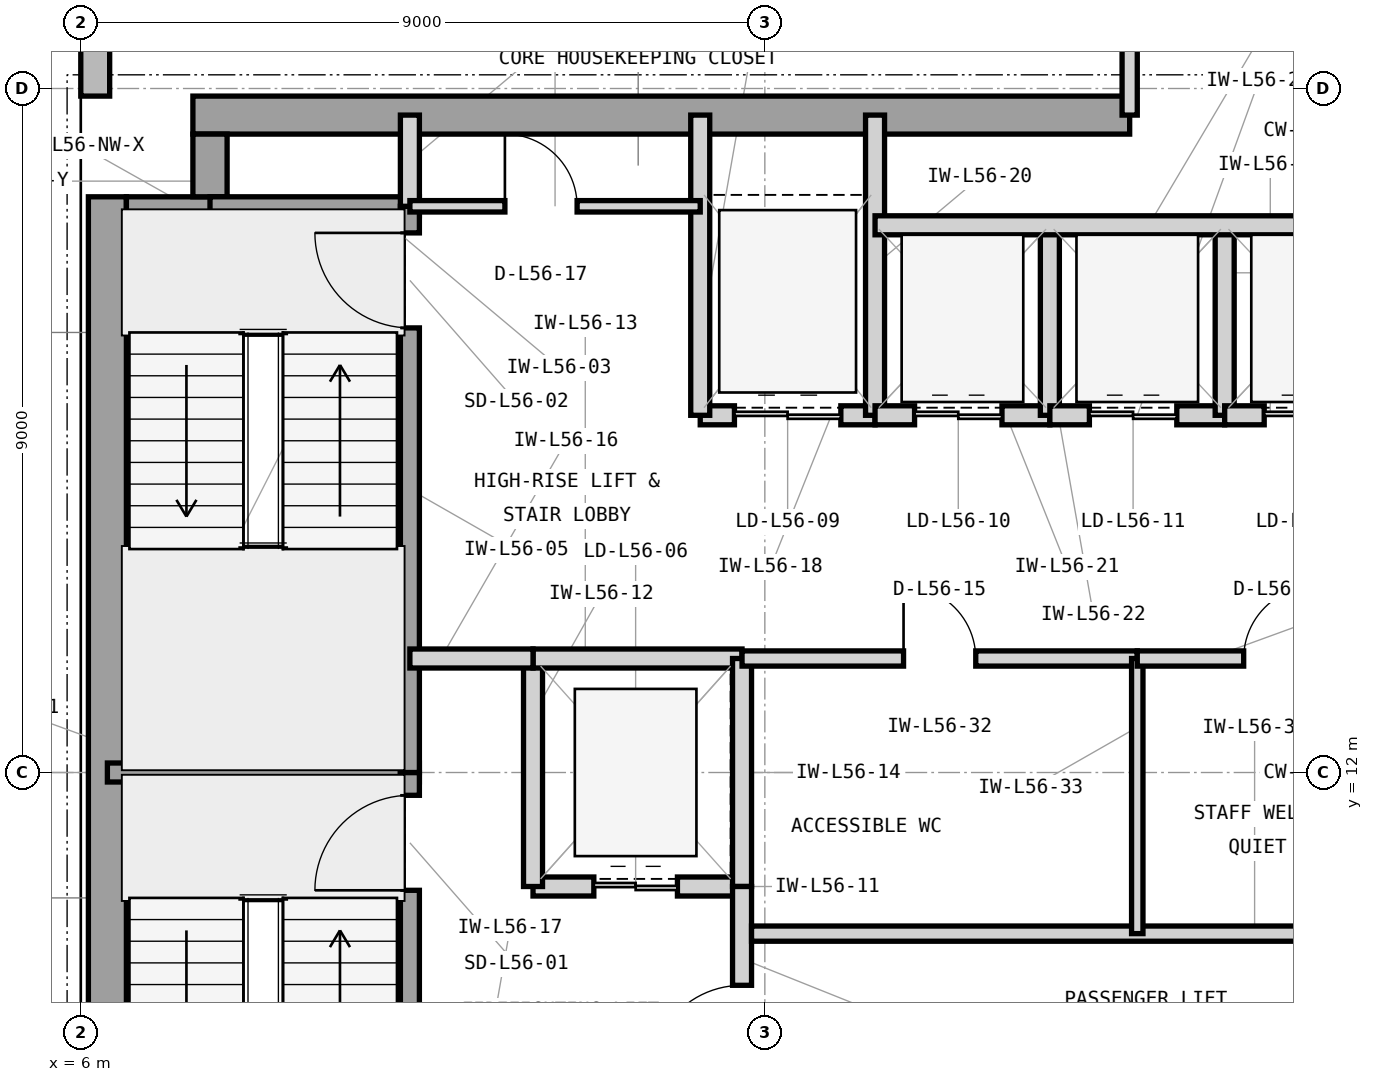
"""IFC4 building model, lengths in metres.
Left out: names, types, materials, properties, quantities, classifications, styles, units other than length and angle.
Written with IfcOpenShell. Run it as: python <this file> out.ifc"""

import sys

from ifc_helpers import new_model, si_unit, direction, frame, frame_2d, origin, place, context, subcontext, project, spatial, rectangle, extrude, element, fill, save


model = new_model("IFC4")
c1 = context("Model", 3, precision=1e-05, world=origin(), true_north=direction((0.0, 1.0)))
c2 = subcontext(c1, "Body", "Model", "MODEL_VIEW")
j1 = project(units=[si_unit("LENGTHUNIT", "METRE"), si_unit("PLANEANGLEUNIT", "RADIAN")], contexts=[c1])
p1 = place(None, origin())
s1 = spatial("IfcSite", under=j1, at=p1, CompositionType="ELEMENT")
p2 = place(p1, origin())
s2 = spatial("IfcBuilding", under=s1, at=p2, CompositionType="ELEMENT")
p3 = place(p2, frame((0.0, 0.0, 231.3)))
s3 = spatial("IfcBuildingStorey", under=s2, at=p3, CompositionType="ELEMENT", Elevation=231.3)
p4 = place(p3, frame((6.35, 4.425, 0.0), z_axis=(0.0, 0.0, 1.0), x_axis=(0.0, 1.0, 0.0)))
e1 = element("IfcWall", 1, at=p4, inside=s3, PredefinedType="SHEAR", context=c2, shape_type="SweptSolid", body=[
    extrude(rectangle(XDim=15.15, YDim=0.5, at=frame_2d((7.575, 0.0))), origin(), (0.0, 0.0, 1.0), 3.9),
])
p5 = place(p3, frame((7.475, 20.65, 0.0), z_axis=(0.0, 0.0, 1.0), x_axis=(1.0, 0.0, 0.0)))
e2 = element("IfcWall", 2, at=p5, inside=s3, PredefinedType="SHEAR", context=c2, shape_type="SweptSolid", body=[
    extrude(rectangle(XDim=12.325, YDim=0.5, at=frame_2d((6.163, 0.0))), origin(), (0.0, 0.0, 1.0), 3.9),
])
p6 = place(p3, frame((6.6, 19.35, 0.0), z_axis=(0.0, 0.0, 1.0), x_axis=(1.0, 0.0, 0.0)))
e3 = element("IfcWall", 3, at=p6, inside=s3, PredefinedType="SHEAR", context=c2, shape_type="SweptSolid", body=[
    extrude(rectangle(XDim=1.325, YDim=0.45, at=frame_2d((0.663, 0.0))), origin(), (0.0, 0.0, 1.0), 3.9),
])
p7 = place(p3, frame((7.7, 19.575, 0.0), z_axis=(0.0, 0.0, 1.0), x_axis=(0.0, 1.0, 0.0)))
e4 = element("IfcWall", 4, at=p7, inside=s3, PredefinedType="SHEAR", context=c2, shape_type="SweptSolid", body=[
    extrude(rectangle(XDim=0.825, YDim=0.45, at=frame_2d((0.413, 0.0))), origin(), (0.0, 0.0, 1.0), 3.9),
])
p8 = place(p3, frame((6.19, 40.4, 0.0), z_axis=(0.0, 0.0, 1.0), x_axis=(0.0, -1.0, 0.0)))
e5 = element("IfcWall", 5, at=p8, inside=s3, PredefinedType="STANDARD", context=c2, shape_type="SweptSolid", body=[
    extrude(rectangle(XDim=19.5, YDim=0.38, at=frame_2d((9.75, 0.0))), origin(), (0.0, 0.0, 1.0), 3.7),
])
p9 = place(p8, frame((6.163, 0.0, 0.9)))
e6 = element("IfcOpeningElement", 6, at=p9, cuts=e5, PredefinedType="OPENING", context=c2, shape_type="SweptSolid", body=[
    extrude(rectangle(XDim=2.3, YDim=2.2, at=frame_2d((1.15, 1.1))), frame((0.0, 0.2, 0.0), z_axis=(0.0, -1.0, 0.0), x_axis=(1.0, 0.0, 0.0)), (0.0, 0.0, 1.0), 0.4),
])
p10 = place(p3, frame((6.35, 12.0, 0.0), z_axis=(0.0, 0.0, 1.0), x_axis=(1.0, 0.0, 0.0)))
e7 = element("IfcWall", 7, at=p10, inside=s3, PredefinedType="SHEAR", context=c2, shape_type="SweptSolid", body=[
    extrude(rectangle(XDim=4.105, YDim=0.25, at=frame_2d((2.052, 0.0))), origin(), (0.0, 0.0, 1.0), 3.9),
])
p11 = place(p3, frame((7.7, 19.45, 0.0), z_axis=(0.0, 0.0, 1.0), x_axis=(1.0, 0.0, 0.0)))
e8 = element("IfcWall", 8, at=p11, inside=s3, PredefinedType="SHEAR", context=c2, shape_type="SweptSolid", body=[
    extrude(rectangle(XDim=2.755, YDim=0.25, at=frame_2d((1.377, 0.0))), origin(), (0.0, 0.0, 1.0), 3.9),
])
p12 = place(p3, frame((10.33, 4.55, 0.0), z_axis=(0.0, 0.0, 1.0), x_axis=(0.0, 1.0, 0.0)))
e9 = element("IfcWall", 9, at=p12, inside=s3, PredefinedType="SHEAR", context=c2, shape_type="SweptSolid", body=[
    extrude(rectangle(XDim=7.45, YDim=0.25, at=frame_2d((3.725, 0.0))), origin(), (0.0, 0.0, 1.0), 3.9),
])
p13 = place(p12, frame((5.9, 0.0, 0.0)))
e10 = element("IfcOpeningElement", 10, at=p13, cuts=e9, PredefinedType="OPENING", context=c2, shape_type="SweptSolid", body=[
    extrude(rectangle(XDim=1.25, YDim=2.2, at=frame_2d((0.625, 1.1))), frame((0.0, 0.135, 0.0), z_axis=(0.0, -1.0, 0.0), x_axis=(1.0, 0.0, 0.0)), (0.0, 0.0, 1.0), 0.27),
])
p14 = place(p3, frame((10.33, 12.0, 0.0), z_axis=(0.0, 0.0, 1.0), x_axis=(0.0, 1.0, 0.0)))
e11 = element("IfcWall", 11, at=p14, inside=s3, PredefinedType="SHEAR", context=c2, shape_type="SweptSolid", body=[
    extrude(rectangle(XDim=7.45, YDim=0.25, at=frame_2d((3.725, 0.0))), origin(), (0.0, 0.0, 1.0), 3.9),
])
p15 = place(p14, frame((5.85, 0.0, 0.0)))
e12 = element("IfcOpeningElement", 12, at=p15, cuts=e11, PredefinedType="OPENING", context=c2, shape_type="SweptSolid", body=[
    extrude(rectangle(XDim=1.25, YDim=2.2, at=frame_2d((0.625, 1.1))), frame((0.0, 0.135, 0.0), z_axis=(0.0, -1.0, 0.0), x_axis=(1.0, 0.0, 0.0)), (0.0, 0.0, 1.0), 0.27),
])
p16 = place(p3, frame((10.33, 19.45, 0.0), z_axis=(0.0, 0.0, 1.0), x_axis=(0.0, 1.0, 0.0)))
e13 = element("IfcWall", 13, at=p16, inside=s3, PredefinedType="PARTITIONING", context=c2, shape_type="SweptSolid", body=[
    extrude(rectangle(XDim=1.2, YDim=0.25, at=frame_2d((0.6, 0.0))), origin(), (0.0, 0.0, 1.0), 3.69),
])
p17 = place(p3, frame((11.95, 10.5, 0.0), z_axis=(0.0, 0.0, 1.0), x_axis=(1.0, 0.0, 0.0)))
e14 = element("IfcWall", 14, at=p17, inside=s3, PredefinedType="PARTITIONING", context=c2, shape_type="SweptSolid", body=[
    extrude(rectangle(XDim=2.75, YDim=0.25, at=frame_2d((1.375, 0.0))), origin(), (0.0, 0.0, 1.0), 3.073),
])
p18 = place(p17, frame((0.8, 0.0, 0.0)))
e15 = element("IfcOpeningElement", 15, at=p18, cuts=e14, PredefinedType="OPENING", context=c2, shape_type="SweptSolid", body=[
    extrude(rectangle(XDim=1.1, YDim=2.25, at=frame_2d((0.55, 1.125))), frame((0.0, 0.135, 0.0), z_axis=(0.0, -1.0, 0.0), x_axis=(1.0, 0.0, 0.0)), (0.0, 0.0, 1.0), 0.27),
])
p19 = place(p3, frame((11.95, 10.5, 0.0), z_axis=(0.0, 0.0, 1.0), x_axis=(0.0, 1.0, 0.0)))
e16 = element("IfcWall", 16, at=p19, inside=s3, PredefinedType="PARTITIONING", context=c2, shape_type="SweptSolid", body=[
    extrude(rectangle(XDim=3.0, YDim=0.25, at=frame_2d((1.5, 0.0))), origin(), (0.0, 0.0, 1.0), 3.69),
])
p20 = place(p3, frame((11.95, 13.5, 0.0), z_axis=(0.0, 0.0, 1.0), x_axis=(1.0, 0.0, 0.0)))
e17 = element("IfcWall", 17, at=p20, inside=s3, PredefinedType="PARTITIONING", context=c2, shape_type="SweptSolid", body=[
    extrude(rectangle(XDim=2.75, YDim=0.25, at=frame_2d((1.375, 0.0))), origin(), (0.0, 0.0, 1.0), 3.073),
])
p21 = place(p3, frame((14.7, 10.5, 0.0), z_axis=(0.0, 0.0, 1.0), x_axis=(0.0, 1.0, 0.0)))
e18 = element("IfcWall", 18, at=p21, inside=s3, PredefinedType="PARTITIONING", context=c2, shape_type="SweptSolid", body=[
    extrude(rectangle(XDim=3.0, YDim=0.25, at=frame_2d((1.5, 0.0))), origin(), (0.0, 0.0, 1.0), 3.69),
])
p22 = place(p3, frame((14.7, 6.7, 0.0), z_axis=(0.0, 0.0, 1.0), x_axis=(0.0, 1.0, 0.0)))
e19 = element("IfcWall", 19, at=p22, inside=s3, PredefinedType="PARTITIONING", context=c2, shape_type="SweptSolid", body=[
    extrude(rectangle(XDim=3.8, YDim=0.25, at=frame_2d((1.9, 0.0))), origin(), (0.0, 0.0, 1.0), 3.69),
])
p23 = place(p22, frame((1.3, 0.0, 0.0)))
e20 = element("IfcOpeningElement", 20, at=p23, cuts=e19, PredefinedType="OPENING", context=c2, shape_type="SweptSolid", body=[
    extrude(rectangle(XDim=1.2, YDim=2.2, at=frame_2d((0.6, 1.1))), frame((0.0, 0.135, 0.0), z_axis=(0.0, -1.0, 0.0), x_axis=(1.0, 0.0, 0.0)), (0.0, 0.0, 1.0), 0.27),
])
p24 = place(p3, frame((10.33, 13.5, 0.0), z_axis=(0.0, 0.0, 1.0), x_axis=(1.0, 0.0, 0.0)))
e21 = element("IfcWall", 21, at=p24, inside=s3, PredefinedType="PARTITIONING", context=c2, shape_type="SweptSolid", body=[
    extrude(rectangle(XDim=1.62, YDim=0.25, at=frame_2d((0.81, 0.0))), origin(), (0.0, 0.0, 1.0), 3.073),
])
p25 = place(p3, frame((14.15, 16.7, 0.0), z_axis=(0.0, 0.0, 1.0), x_axis=(1.0, 0.0, 0.0)))
e22 = element("IfcWall", 22, at=p25, inside=s3, PredefinedType="PARTITIONING", context=c2, shape_type="SweptSolid", body=[
    extrude(rectangle(XDim=2.3, YDim=0.25, at=frame_2d((1.15, 0.0))), origin(), (0.0, 0.0, 1.0), 3.073),
])
p26 = place(p25, frame((0.45, 0.0, 0.0)))
e23 = element("IfcOpeningElement", 23, at=p26, cuts=e22, PredefinedType="OPENING", context=c2, shape_type="SweptSolid", body=[
    extrude(rectangle(XDim=1.4, YDim=2.35, at=frame_2d((0.7, 1.175))), frame((0.0, 0.135, 0.0), z_axis=(0.0, -1.0, 0.0), x_axis=(1.0, 0.0, 0.0)), (0.0, 0.0, 1.0), 0.27),
])
for number, where, z_axis, x_axis in (
    (24, (14.15, 16.7, 0.0), (0.0, 0.0, 1.0), (0.0, 1.0, 0.0)),
    (25, (16.45, 16.7, 0.0), (0.0, 0.0, 1.0), (0.0, 1.0, 0.0)),
):
    element("IfcWall", number, at=place(p3, frame(where, z_axis=z_axis, x_axis=x_axis)), inside=s3, PredefinedType="PARTITIONING", context=c2, shape_type="SweptSolid", body=[
        extrude(rectangle(XDim=3.95, YDim=0.25, at=frame_2d((1.975, 0.0))), origin(), (0.0, 0.0, 1.0), 3.69),
    ])
p27 = place(p3, frame((16.45, 16.7, 0.0), z_axis=(0.0, 0.0, 1.0), x_axis=(1.0, 0.0, 0.0)))
e26 = element("IfcWall", 26, at=p27, inside=s3, PredefinedType="PARTITIONING", context=c2, shape_type="SweptSolid", body=[
    extrude(rectangle(XDim=2.3, YDim=0.25, at=frame_2d((1.15, 0.0))), origin(), (0.0, 0.0, 1.0), 3.073),
])
p28 = place(p27, frame((0.52, 0.0, 0.0)))
e27 = element("IfcOpeningElement", 27, at=p28, cuts=e26, PredefinedType="OPENING", context=c2, shape_type="SweptSolid", body=[
    extrude(rectangle(XDim=1.15, YDim=2.25, at=frame_2d((0.575, 1.125))), frame((0.0, 0.135, 0.0), z_axis=(0.0, -1.0, 0.0), x_axis=(1.0, 0.0, 0.0)), (0.0, 0.0, 1.0), 0.27),
])
p29 = place(p3, frame((18.75, 16.7, 0.0), z_axis=(0.0, 0.0, 1.0), x_axis=(0.0, 1.0, 0.0)))
e28 = element("IfcWall", 28, at=p29, inside=s3, PredefinedType="PARTITIONING", context=c2, shape_type="SweptSolid", body=[
    extrude(rectangle(XDim=2.5, YDim=0.25, at=frame_2d((1.25, 0.0))), origin(), (0.0, 0.0, 1.0), 3.69),
])
p30 = place(p3, frame((18.75, 16.7, 0.0), z_axis=(0.0, 0.0, 1.0), x_axis=(1.0, 0.0, 0.0)))
e29 = element("IfcWall", 29, at=p30, inside=s3, PredefinedType="PARTITIONING", context=c2, shape_type="SweptSolid", body=[
    extrude(rectangle(XDim=2.3, YDim=0.25, at=frame_2d((1.15, 0.0))), origin(), (0.0, 0.0, 1.0), 3.073),
])
p31 = place(p30, frame((0.52, 0.0, 0.0)))
e30 = element("IfcOpeningElement", 30, at=p31, cuts=e29, PredefinedType="OPENING", context=c2, shape_type="SweptSolid", body=[
    extrude(rectangle(XDim=1.15, YDim=2.25, at=frame_2d((0.575, 1.125))), frame((0.0, 0.135, 0.0), z_axis=(0.0, -1.0, 0.0), x_axis=(1.0, 0.0, 0.0)), (0.0, 0.0, 1.0), 0.27),
])
p32 = place(p3, frame((21.05, 16.7, 0.0), z_axis=(0.0, 0.0, 1.0), x_axis=(0.0, 1.0, 0.0)))
e31 = element("IfcWall", 31, at=p32, inside=s3, PredefinedType="PARTITIONING", context=c2, shape_type="SweptSolid", body=[
    extrude(rectangle(XDim=2.5, YDim=0.25, at=frame_2d((1.25, 0.0))), origin(), (0.0, 0.0, 1.0), 3.69),
])
p33 = place(p3, frame((21.05, 16.7, 0.0), z_axis=(0.0, 0.0, 1.0), x_axis=(1.0, 0.0, 0.0)))
e32 = element("IfcWall", 32, at=p33, inside=s3, PredefinedType="PARTITIONING", context=c2, shape_type="SweptSolid", body=[
    extrude(rectangle(XDim=2.4, YDim=0.25, at=frame_2d((1.2, 0.0))), origin(), (0.0, 0.0, 1.0), 3.073),
])
p34 = place(p33, frame((0.52, 0.0, 0.0)))
e33 = element("IfcOpeningElement", 33, at=p34, cuts=e32, PredefinedType="OPENING", context=c2, shape_type="SweptSolid", body=[
    extrude(rectangle(XDim=1.15, YDim=2.25, at=frame_2d((0.575, 1.125))), frame((0.0, 0.135, 0.0), z_axis=(0.0, -1.0, 0.0), x_axis=(1.0, 0.0, 0.0)), (0.0, 0.0, 1.0), 0.27),
])
p35 = place(p3, frame((16.45, 19.2, 0.0), z_axis=(0.0, 0.0, 1.0), x_axis=(1.0, 0.0, 0.0)))
e34 = element("IfcWall", 34, at=p35, inside=s3, PredefinedType="PARTITIONING", context=c2, shape_type="SweptSolid", body=[
    extrude(rectangle(XDim=7.2, YDim=0.25, at=frame_2d((3.6, 0.0))), origin(), (0.0, 0.0, 1.0), 3.69),
])
p36 = place(p3, frame((14.825, 9.88, 0.0), z_axis=(0.0, 0.0, 1.0), x_axis=(1.0, 0.0, 0.0)))
e35 = element("IfcWall", 35, at=p36, inside=s3, PredefinedType="PARTITIONING", context=c2, shape_type="SweptSolid", body=[
    extrude(rectangle(XDim=8.825, YDim=0.2, at=frame_2d((4.413, 0.0))), origin(), (0.0, 0.0, 1.0), 3.69),
])
p37 = place(p3, frame((14.7, 13.5, 0.0), z_axis=(0.0, 0.0, 1.0), x_axis=(1.0, 0.0, 0.0)))
e36 = element("IfcWall", 36, at=p37, inside=s3, PredefinedType="PARTITIONING", context=c2, shape_type="SweptSolid", body=[
    extrude(rectangle(XDim=5.2, YDim=0.2, at=frame_2d((2.6, 0.0))), origin(), (0.0, 0.0, 1.0), 3.073),
])
p38 = place(p37, frame((2.125, 0.0, 0.0)))
e37 = element("IfcOpeningElement", 37, at=p38, cuts=e36, PredefinedType="OPENING", context=c2, shape_type="SweptSolid", body=[
    extrude(rectangle(XDim=0.95, YDim=2.1, at=frame_2d((0.475, 1.05))), frame((0.0, 0.11, 0.0), z_axis=(0.0, -1.0, 0.0), x_axis=(1.0, 0.0, 0.0)), (0.0, 0.0, 1.0), 0.22),
])
p39 = place(p3, frame((19.9, 9.88, 0.0), z_axis=(0.0, 0.0, 1.0), x_axis=(0.0, 1.0, 0.0)))
e38 = element("IfcWall", 38, at=p39, inside=s3, PredefinedType="PARTITIONING", context=c2, shape_type="SweptSolid", body=[
    extrude(rectangle(XDim=3.62, YDim=0.15, at=frame_2d((1.81, 0.0))), origin(), (0.0, 0.0, 1.0), 3.69),
])
p40 = place(p3, frame((19.9, 13.5, 0.0), z_axis=(0.0, 0.0, 1.0), x_axis=(1.0, 0.0, 0.0)))
e39 = element("IfcWall", 39, at=p40, inside=s3, PredefinedType="PARTITIONING", context=c2, shape_type="SweptSolid", body=[
    extrude(rectangle(XDim=3.75, YDim=0.2, at=frame_2d((1.875, 0.0))), origin(), (0.0, 0.0, 1.0), 3.073),
])
p41 = place(p40, frame((1.4, 0.0, 0.0)))
e40 = element("IfcOpeningElement", 40, at=p41, cuts=e39, PredefinedType="OPENING", context=c2, shape_type="SweptSolid", body=[
    extrude(rectangle(XDim=0.95, YDim=2.1, at=frame_2d((0.475, 1.05))), frame((0.0, 0.11, 0.0), z_axis=(0.0, -1.0, 0.0), x_axis=(1.0, 0.0, 0.0)), (0.0, 0.0, 1.0), 0.22),
])
p42 = place(p3, frame((10.33, 19.45, 0.0), z_axis=(0.0, 0.0, 1.0), x_axis=(1.0, 0.0, 0.0)))
e41 = element("IfcWall", 41, at=p42, inside=s3, PredefinedType="PARTITIONING", context=c2, shape_type="SweptSolid", body=[
    extrude(rectangle(XDim=3.82, YDim=0.15, at=frame_2d((1.91, 0.0))), origin(), (0.0, 0.0, 1.0), 3.69),
])
p43 = place(p42, frame((1.25, 0.0, 0.0)))
e42 = element("IfcOpeningElement", 42, at=p43, cuts=e41, PredefinedType="OPENING", context=c2, shape_type="SweptSolid", body=[
    extrude(rectangle(XDim=0.95, YDim=2.1, at=frame_2d((0.475, 1.05))), frame((0.0, 0.085, 0.0), z_axis=(0.0, -1.0, 0.0), x_axis=(1.0, 0.0, 0.0)), (0.0, 0.0, 1.0), 0.17),
])
p44 = place(p3, frame((19.8, 20.65, 0.0), z_axis=(0.0, 0.0, 1.0), x_axis=(0.0, 1.0, 0.0)))
e43 = element("IfcWall", 43, at=p44, inside=s3, PredefinedType="PARTITIONING", context=c2, shape_type="SweptSolid", body=[
    extrude(rectangle(XDim=6.15, YDim=0.2, at=frame_2d((3.075, 0.0))), origin(), (0.0, 0.0, 1.0), 3.69),
])
p45 = place(p13, origin())
e44 = element("IfcDoor", 44, at=p45, inside=s3, OperationType="SINGLE_SWING_LEFT", PredefinedType="DOOR", context=c2, shape_type="SweptSolid", body=[
    extrude(rectangle(XDim=1.25, YDim=2.2, at=frame_2d((0.625, 1.1))), frame((0.0, 0.025, 0.0), z_axis=(0.0, -1.0, 0.0), x_axis=(1.0, 0.0, 0.0)), (0.0, 0.0, 1.0), 0.05),
])
fill(e10, e44)
p46 = place(p15, origin())
e45 = element("IfcDoor", 45, at=p46, inside=s3, OperationType="SINGLE_SWING_RIGHT", PredefinedType="DOOR", context=c2, shape_type="SweptSolid", body=[
    extrude(rectangle(XDim=1.25, YDim=2.2, at=frame_2d((0.625, 1.1))), frame((0.0, 0.025, 0.0), z_axis=(0.0, -1.0, 0.0), x_axis=(1.0, 0.0, 0.0)), (0.0, 0.0, 1.0), 0.05),
])
fill(e12, e45)
p47 = place(p18, origin())
e46 = element("IfcDoor", 46, at=p47, inside=s3, OperationType="DOUBLE_DOOR_SLIDING", PredefinedType="DOOR", context=c2, shape_type="SweptSolid", body=[
    extrude(rectangle(XDim=1.1, YDim=2.25, at=frame_2d((0.55, 1.125))), frame((0.0, 0.025, 0.0), z_axis=(0.0, -1.0, 0.0), x_axis=(1.0, 0.0, 0.0)), (0.0, 0.0, 1.0), 0.05),
])
fill(e15, e46)
p48 = place(p23, origin())
e47 = element("IfcDoor", 47, at=p48, inside=s3, OperationType="SINGLE_SWING_LEFT", PredefinedType="DOOR", context=c2, shape_type="SweptSolid", body=[
    extrude(rectangle(XDim=1.2, YDim=2.2, at=frame_2d((0.6, 1.1))), frame((0.0, 0.025, 0.0), z_axis=(0.0, -1.0, 0.0), x_axis=(1.0, 0.0, 0.0)), (0.0, 0.0, 1.0), 0.05),
])
fill(e20, e47)
p49 = place(p26, origin())
e48 = element("IfcDoor", 48, at=p49, inside=s3, OperationType="DOUBLE_DOOR_SLIDING", PredefinedType="DOOR", context=c2, shape_type="SweptSolid", body=[
    extrude(rectangle(XDim=1.4, YDim=2.35, at=frame_2d((0.7, 1.175))), frame((0.0, 0.025, 0.0), z_axis=(0.0, -1.0, 0.0), x_axis=(1.0, 0.0, 0.0)), (0.0, 0.0, 1.0), 0.05),
])
fill(e23, e48)
p50 = place(p28, origin())
e49 = element("IfcDoor", 49, at=p50, inside=s3, OperationType="DOUBLE_DOOR_SLIDING", PredefinedType="DOOR", context=c2, shape_type="SweptSolid", body=[
    extrude(rectangle(XDim=1.15, YDim=2.25, at=frame_2d((0.575, 1.125))), frame((0.0, 0.025, 0.0), z_axis=(0.0, -1.0, 0.0), x_axis=(1.0, 0.0, 0.0)), (0.0, 0.0, 1.0), 0.05),
])
fill(e27, e49)
p51 = place(p31, origin())
e50 = element("IfcDoor", 50, at=p51, inside=s3, OperationType="DOUBLE_DOOR_SLIDING", PredefinedType="DOOR", context=c2, shape_type="SweptSolid", body=[
    extrude(rectangle(XDim=1.15, YDim=2.25, at=frame_2d((0.575, 1.125))), frame((0.0, 0.025, 0.0), z_axis=(0.0, -1.0, 0.0), x_axis=(1.0, 0.0, 0.0)), (0.0, 0.0, 1.0), 0.05),
])
fill(e30, e50)
p52 = place(p34, origin())
e51 = element("IfcDoor", 51, at=p52, inside=s3, OperationType="DOUBLE_DOOR_SLIDING", PredefinedType="DOOR", context=c2, shape_type="SweptSolid", body=[
    extrude(rectangle(XDim=1.15, YDim=2.25, at=frame_2d((0.575, 1.125))), frame((0.0, 0.025, 0.0), z_axis=(0.0, -1.0, 0.0), x_axis=(1.0, 0.0, 0.0)), (0.0, 0.0, 1.0), 0.05),
])
fill(e33, e51)
p53 = place(p38, origin())
e52 = element("IfcDoor", 52, at=p53, inside=s3, OperationType="SINGLE_SWING_LEFT", PredefinedType="DOOR", context=c2, shape_type="SweptSolid", body=[
    extrude(rectangle(XDim=0.95, YDim=2.1, at=frame_2d((0.475, 1.05))), frame((0.0, 0.025, 0.0), z_axis=(0.0, -1.0, 0.0), x_axis=(1.0, 0.0, 0.0)), (0.0, 0.0, 1.0), 0.05),
])
fill(e37, e52)
p54 = place(p41, origin())
e53 = element("IfcDoor", 53, at=p54, inside=s3, OperationType="SINGLE_SWING_RIGHT", PredefinedType="DOOR", context=c2, shape_type="SweptSolid", body=[
    extrude(rectangle(XDim=0.95, YDim=2.1, at=frame_2d((0.475, 1.05))), frame((0.0, 0.025, 0.0), z_axis=(0.0, -1.0, 0.0), x_axis=(1.0, 0.0, 0.0)), (0.0, 0.0, 1.0), 0.05),
])
fill(e40, e53)
p55 = place(p43, origin())
e54 = element("IfcDoor", 54, at=p55, inside=s3, OperationType="SINGLE_SWING_LEFT", PredefinedType="DOOR", context=c2, shape_type="SweptSolid", body=[
    extrude(rectangle(XDim=0.95, YDim=2.1, at=frame_2d((0.475, 1.05))), frame((0.0, 0.025, 0.0), z_axis=(0.0, -1.0, 0.0), x_axis=(1.0, 0.0, 0.0)), (0.0, 0.0, 1.0), 0.05),
])
fill(e42, e54)
save(model, sys.argv[1])
